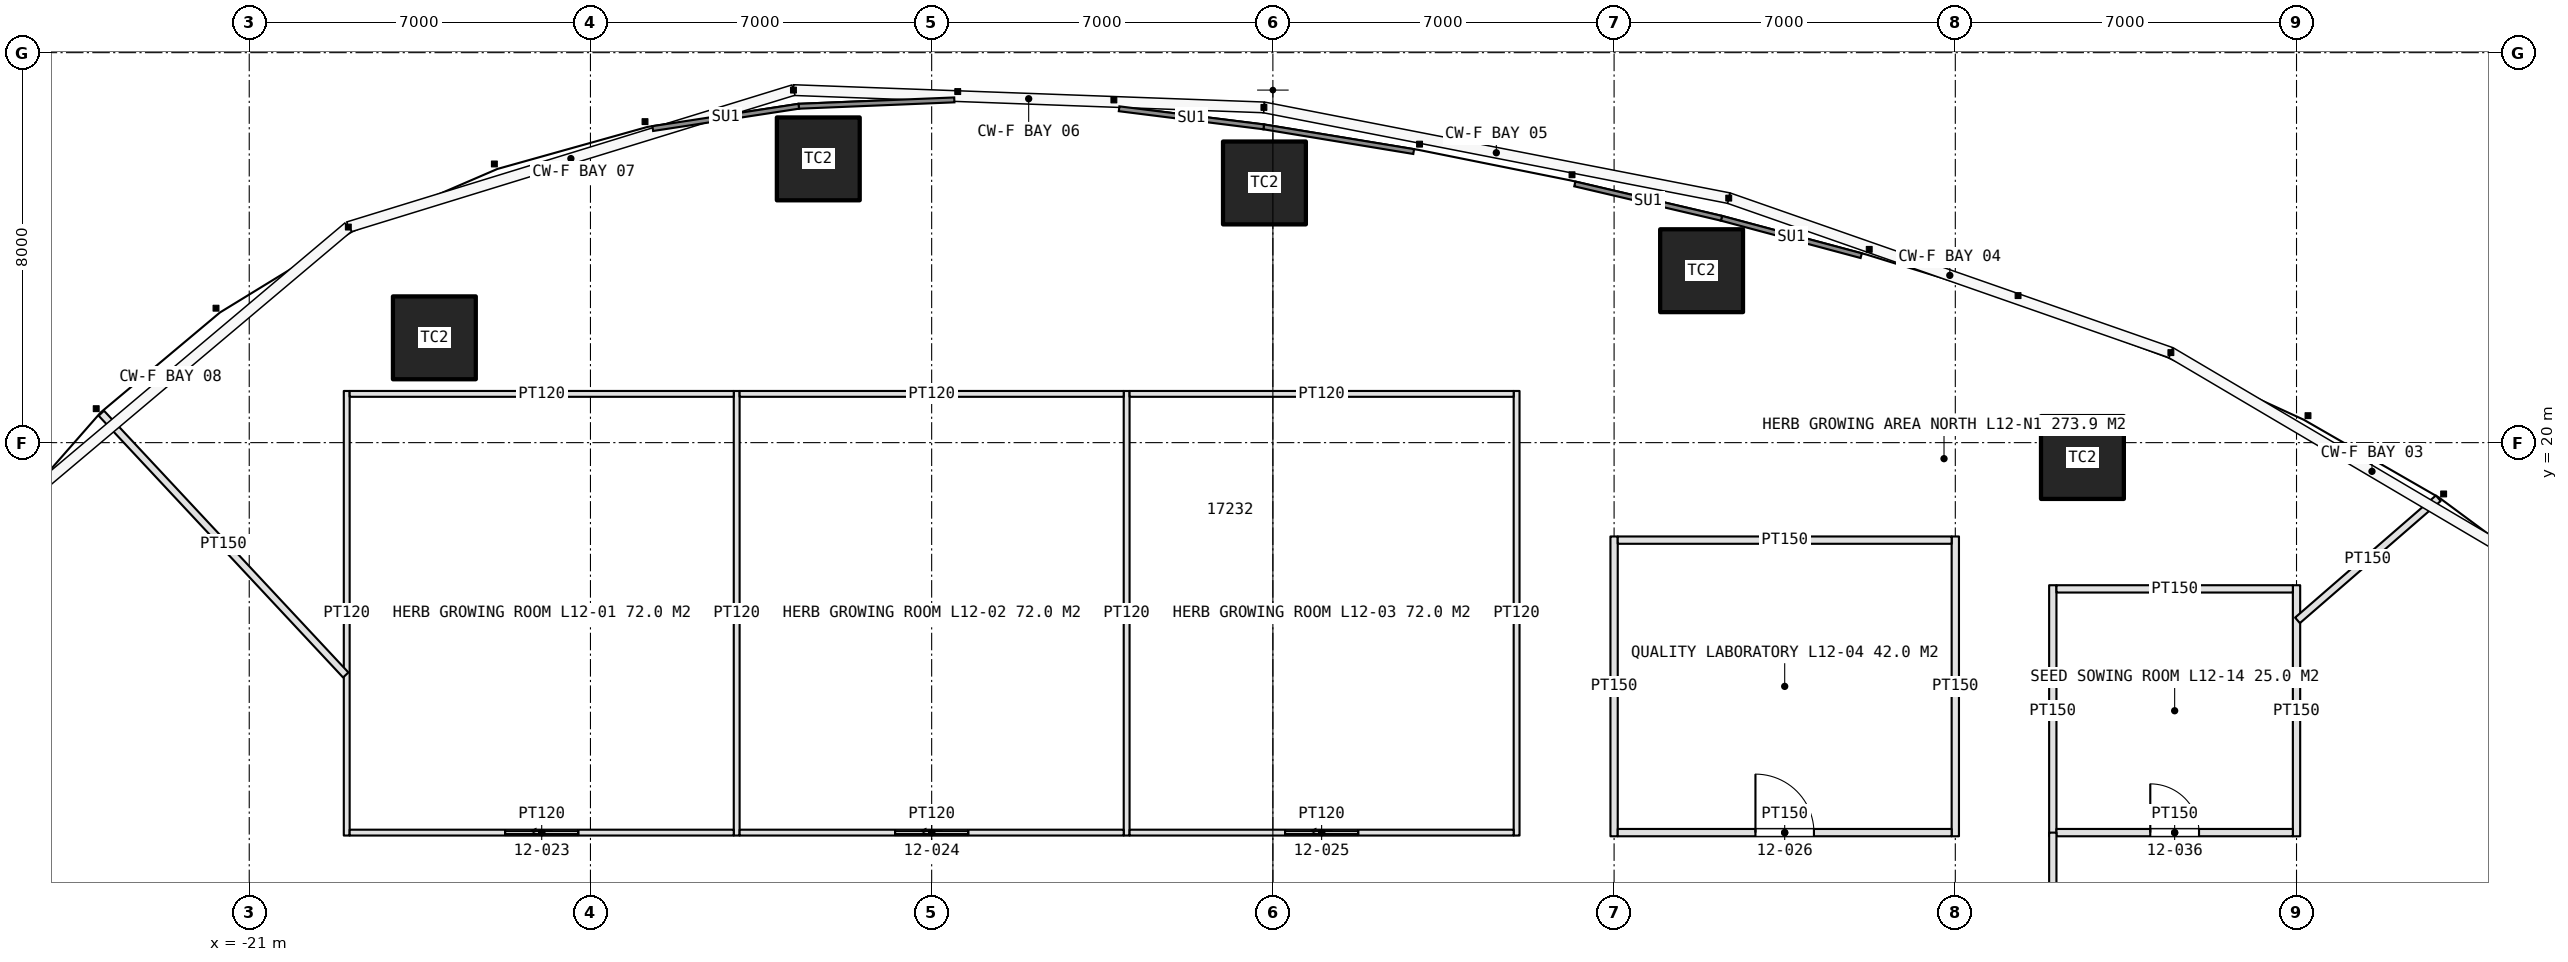
"""IFC4 building model, lengths in metres.
Left out: names, types, materials, properties, quantities, classifications, styles, units other than length and angle.
Written with IfcOpenShell. Run it as: python <this file> out.ifc"""

import sys

from ifc_helpers import new_model, si_unit, direction, frame, frame_2d, origin, origin_2d, place, context, subcontext, project, spatial, rectangle, extrude, element, fill, save


model = new_model("IFC4")
c1 = context("Model", 3, precision=1e-05, world=origin(), true_north=direction((0.0, 1.0)))
c2 = subcontext(c1, "Body", "Model", "MODEL_VIEW")
j1 = project(units=[si_unit("LENGTHUNIT", "METRE"), si_unit("PLANEANGLEUNIT", "RADIAN")], contexts=[c1])
p1 = place(None, origin())
s1 = spatial("IfcSite", under=j1, at=p1, CompositionType="ELEMENT")
p2 = place(p1, origin())
s2 = spatial("IfcBuilding", under=s1, at=p2, CompositionType="ELEMENT")
p3 = place(p2, frame((0.0, 0.0, 60.0)))
s3 = spatial("IfcBuildingStorey", under=s2, at=p3, CompositionType="ELEMENT", Elevation=60.0)
for number, where, z_axis, x_axis in (
    (1, (16.608, 19.695, 0.0), (0.0, 0.0, 1.0), (1.0, 0.0, 0.0)),
    (2, (8.795, 23.527, 0.0), (0.0, 0.0, 1.0), (1.0, 0.0, 0.0)),
    (3, (-0.173, 25.327, 0.0), (0.0, 0.0, 1.0), (1.0, 0.0, 0.0)),
    (4, (-9.326, 25.821, 0.0), (0.0, 0.0, 1.0), (1.0, 0.0, 0.0)),
    (5, (-17.202, 22.15, 0.0), (0.0, 0.0, 1.0), (1.0, 0.0, 0.0)),
):
    element("IfcColumn", number, at=place(p3, frame(where, z_axis=z_axis, x_axis=x_axis)), inside=s3, PredefinedType="COLUMN", context=c2, shape_type="SweptSolid", body=[
        extrude(rectangle(XDim=1.7, YDim=1.7, at=origin_2d()), origin(), (0.0, 0.0, 1.0), 5.0),
    ])
for number, where, z_axis, x_axis in (
    (6, (-19.0, 11.94, 0.0), (0.0, 0.0, 1.0), (0.0, 1.0, 0.0)),
    (7, (-11.0, 11.94, 0.0), (0.0, 0.0, 1.0), (0.0, 1.0, 0.0)),
    (8, (-3.0, 11.94, 0.0), (0.0, 0.0, 1.0), (0.0, 1.0, 0.0)),
    (9, (5.0, 11.94, 0.0), (0.0, 0.0, 1.0), (0.0, 1.0, 0.0)),
):
    element("IfcWall", number, at=place(p3, frame(where, z_axis=z_axis, x_axis=x_axis)), inside=s3, PredefinedType="PARTITIONING", context=c2, shape_type="SweptSolid", body=[
        extrude(rectangle(XDim=9.12, YDim=0.12, at=frame_2d((4.56, 0.0))), origin(), (0.0, 0.0, 1.0), 3.6),
    ])
p4 = place(p3, frame((-18.94, 12.0, 0.0), z_axis=(0.0, 0.0, 1.0), x_axis=(1.0, 0.0, 0.0)))
e10 = element("IfcWall", 10, at=p4, inside=s3, PredefinedType="PARTITIONING", context=c2, shape_type="SweptSolid", body=[
    extrude(rectangle(XDim=7.88, YDim=0.12, at=frame_2d((3.94, 0.0))), origin(), (0.0, 0.0, 1.0), 3.6),
])
p5 = place(p4, frame((3.19, 0.0, 0.0)))
e11 = element("IfcOpeningElement", 11, at=p5, cuts=e10, PredefinedType="OPENING", context=c2, shape_type="SweptSolid", body=[
    extrude(rectangle(XDim=1.5, YDim=2.5, at=frame_2d((0.75, 1.25))), frame((0.0, 0.07, 0.0), z_axis=(0.0, -1.0, 0.0), x_axis=(1.0, 0.0, 0.0)), (0.0, 0.0, 1.0), 0.14),
])
p6 = place(p3, frame((-18.94, 21.0, 0.0), z_axis=(0.0, 0.0, 1.0), x_axis=(1.0, 0.0, 0.0)))
e12 = element("IfcWall", 12, at=p6, inside=s3, PredefinedType="PARTITIONING", context=c2, shape_type="SweptSolid", body=[
    extrude(rectangle(XDim=7.88, YDim=0.12, at=frame_2d((3.94, 0.0))), origin(), (0.0, 0.0, 1.0), 3.6),
])
p7 = place(p3, frame((-10.94, 12.0, 0.0), z_axis=(0.0, 0.0, 1.0), x_axis=(1.0, 0.0, 0.0)))
e13 = element("IfcWall", 13, at=p7, inside=s3, PredefinedType="PARTITIONING", context=c2, shape_type="SweptSolid", body=[
    extrude(rectangle(XDim=7.88, YDim=0.12, at=frame_2d((3.94, 0.0))), origin(), (0.0, 0.0, 1.0), 3.6),
])
p8 = place(p7, frame((3.19, 0.0, 0.0)))
e14 = element("IfcOpeningElement", 14, at=p8, cuts=e13, PredefinedType="OPENING", context=c2, shape_type="SweptSolid", body=[
    extrude(rectangle(XDim=1.5, YDim=2.5, at=frame_2d((0.75, 1.25))), frame((0.0, 0.07, 0.0), z_axis=(0.0, -1.0, 0.0), x_axis=(1.0, 0.0, 0.0)), (0.0, 0.0, 1.0), 0.14),
])
p9 = place(p3, frame((-10.94, 21.0, 0.0), z_axis=(0.0, 0.0, 1.0), x_axis=(1.0, 0.0, 0.0)))
e15 = element("IfcWall", 15, at=p9, inside=s3, PredefinedType="PARTITIONING", context=c2, shape_type="SweptSolid", body=[
    extrude(rectangle(XDim=7.88, YDim=0.12, at=frame_2d((3.94, 0.0))), origin(), (0.0, 0.0, 1.0), 3.6),
])
p10 = place(p3, frame((-2.94, 12.0, 0.0), z_axis=(0.0, 0.0, 1.0), x_axis=(1.0, 0.0, 0.0)))
e16 = element("IfcWall", 16, at=p10, inside=s3, PredefinedType="PARTITIONING", context=c2, shape_type="SweptSolid", body=[
    extrude(rectangle(XDim=7.88, YDim=0.12, at=frame_2d((3.94, 0.0))), origin(), (0.0, 0.0, 1.0), 3.6),
])
p11 = place(p10, frame((3.19, 0.0, 0.0)))
e17 = element("IfcOpeningElement", 17, at=p11, cuts=e16, PredefinedType="OPENING", context=c2, shape_type="SweptSolid", body=[
    extrude(rectangle(XDim=1.5, YDim=2.5, at=frame_2d((0.75, 1.25))), frame((0.0, 0.07, 0.0), z_axis=(0.0, -1.0, 0.0), x_axis=(1.0, 0.0, 0.0)), (0.0, 0.0, 1.0), 0.14),
])
p12 = place(p3, frame((-2.94, 21.0, 0.0), z_axis=(0.0, 0.0, 1.0), x_axis=(1.0, 0.0, 0.0)))
e18 = element("IfcWall", 18, at=p12, inside=s3, PredefinedType="PARTITIONING", context=c2, shape_type="SweptSolid", body=[
    extrude(rectangle(XDim=7.88, YDim=0.12, at=frame_2d((3.94, 0.0))), origin(), (0.0, 0.0, 1.0), 3.6),
])
for number, where, z_axis, x_axis in (
    (19, (7.0, 11.925, 0.0), (0.0, 0.0, 1.0), (0.0, 1.0, 0.0)),
    (20, (14.0, 11.925, 0.0), (0.0, 0.0, 1.0), (0.0, 1.0, 0.0)),
):
    element("IfcWall", number, at=place(p3, frame(where, z_axis=z_axis, x_axis=x_axis)), inside=s3, PredefinedType="PARTITIONING", context=c2, shape_type="SweptSolid", body=[
        extrude(rectangle(XDim=6.15, YDim=0.15, at=frame_2d((3.075, 0.0))), origin(), (0.0, 0.0, 1.0), 3.6),
    ])
p13 = place(p3, frame((7.075, 12.0, 0.0), z_axis=(0.0, 0.0, 1.0), x_axis=(1.0, 0.0, 0.0)))
e21 = element("IfcWall", 21, at=p13, inside=s3, PredefinedType="PARTITIONING", context=c2, shape_type="SweptSolid", body=[
    extrude(rectangle(XDim=6.85, YDim=0.15, at=frame_2d((3.425, 0.0))), origin(), (0.0, 0.0, 1.0), 3.6),
])
p14 = place(p13, frame((2.825, 0.0, 0.0)))
e22 = element("IfcOpeningElement", 22, at=p14, cuts=e21, PredefinedType="OPENING", context=c2, shape_type="SweptSolid", body=[
    extrude(rectangle(XDim=1.2, YDim=2.3, at=frame_2d((0.6, 1.15))), frame((0.0, 0.085, 0.0), z_axis=(0.0, -1.0, 0.0), x_axis=(1.0, 0.0, 0.0)), (0.0, 0.0, 1.0), 0.17),
])
p15 = place(p3, frame((7.075, 18.0, 0.0), z_axis=(0.0, 0.0, 1.0), x_axis=(1.0, 0.0, 0.0)))
e23 = element("IfcWall", 23, at=p15, inside=s3, PredefinedType="PARTITIONING", context=c2, shape_type="SweptSolid", body=[
    extrude(rectangle(XDim=6.85, YDim=0.15, at=frame_2d((3.425, 0.0))), origin(), (0.0, 0.0, 1.0), 3.6),
])
for number, where, z_axis, x_axis in (
    (24, (16.0, 11.925, 0.0), (0.0, 0.0, 1.0), (0.0, 1.0, 0.0)),
    (25, (21.0, 11.925, 0.0), (0.0, 0.0, 1.0), (0.0, 1.0, 0.0)),
):
    element("IfcWall", number, at=place(p3, frame(where, z_axis=z_axis, x_axis=x_axis)), inside=s3, PredefinedType="PARTITIONING", context=c2, shape_type="SweptSolid", body=[
        extrude(rectangle(XDim=5.15, YDim=0.15, at=frame_2d((2.575, 0.0))), origin(), (0.0, 0.0, 1.0), 3.6),
    ])
p16 = place(p3, frame((16.075, 12.0, 0.0), z_axis=(0.0, 0.0, 1.0), x_axis=(1.0, 0.0, 0.0)))
e26 = element("IfcWall", 26, at=p16, inside=s3, PredefinedType="PARTITIONING", context=c2, shape_type="SweptSolid", body=[
    extrude(rectangle(XDim=4.85, YDim=0.15, at=frame_2d((2.425, 0.0))), origin(), (0.0, 0.0, 1.0), 3.6),
])
p17 = place(p16, frame((1.925, 0.0, 0.0)))
e27 = element("IfcOpeningElement", 27, at=p17, cuts=e26, PredefinedType="OPENING", context=c2, shape_type="SweptSolid", body=[
    extrude(rectangle(XDim=1.0, YDim=2.2, at=frame_2d((0.5, 1.1))), frame((0.0, 0.085, 0.0), z_axis=(0.0, -1.0, 0.0), x_axis=(1.0, 0.0, 0.0)), (0.0, 0.0, 1.0), 0.17),
])
p18 = place(p3, frame((16.075, 17.0, 0.0), z_axis=(0.0, 0.0, 1.0), x_axis=(1.0, 0.0, 0.0)))
e28 = element("IfcWall", 28, at=p18, inside=s3, PredefinedType="PARTITIONING", context=c2, shape_type="SweptSolid", body=[
    extrude(rectangle(XDim=4.85, YDim=0.15, at=frame_2d((2.425, 0.0))), origin(), (0.0, 0.0, 1.0), 3.6),
])
p19 = place(p3, frame((-19.02, 15.234, 0.0), z_axis=(0.0, 0.0, 1.0), x_axis=(-0.682519491562, 0.730867391281, 0.0)))
e29 = element("IfcWall", 29, at=p19, inside=s3, PredefinedType="PARTITIONING", context=c2, shape_type="SweptSolid", body=[
    extrude(rectangle(XDim=7.347, YDim=0.15, at=frame_2d((3.674, 0.0))), origin(), (0.0, 0.0, 1.0), 3.6),
])
p20 = place(p3, frame((21.02, 16.354, 0.0), z_axis=(0.0, 0.0, 1.0), x_axis=(0.755425653008, 0.655234372402, 0.0)))
e30 = element("IfcWall", 30, at=p20, inside=s3, PredefinedType="PARTITIONING", context=c2, shape_type="SweptSolid", body=[
    extrude(rectangle(XDim=3.823, YDim=0.15, at=frame_2d((1.912, 0.0))), origin(), (0.0, 0.0, 1.0), 3.6),
])
p21 = place(p3, frame((16.0, 5.5, 0.0), z_axis=(0.0, 0.0, 1.0), x_axis=(0.0, 1.0, 0.0)))
e31 = element("IfcWall", 31, at=p21, inside=s3, PredefinedType="PARTITIONING", context=c2, shape_type="SweptSolid", body=[
    extrude(rectangle(XDim=6.5, YDim=0.15, at=frame_2d((3.25, 0.0))), origin(), (0.0, 0.0, 1.0), 3.6),
])
p22 = place(p21, frame((0.4, 0.0, 0.0)))
e32 = element("IfcOpeningElement", 32, at=p22, cuts=e31, PredefinedType="OPENING", context=c2, shape_type="SweptSolid", body=[
    extrude(rectangle(XDim=1.6, YDim=2.4, at=frame_2d((0.8, 1.2))), frame((0.0, 0.085, 0.0), z_axis=(0.0, -1.0, 0.0), x_axis=(1.0, 0.0, 0.0)), (0.0, 0.0, 1.0), 0.17),
])
p23 = place(p5, origin())
e33 = element("IfcDoor", 33, at=p23, inside=s3, OperationType="SLIDING_TO_LEFT", PredefinedType="DOOR", context=c2, shape_type="SweptSolid", body=[
    extrude(rectangle(XDim=1.5, YDim=2.5, at=frame_2d((0.75, 1.25))), frame((0.0, 0.025, 0.0), z_axis=(0.0, -1.0, 0.0), x_axis=(1.0, 0.0, 0.0)), (0.0, 0.0, 1.0), 0.05),
])
fill(e11, e33)
p24 = place(p8, origin())
e34 = element("IfcDoor", 34, at=p24, inside=s3, OperationType="SLIDING_TO_LEFT", PredefinedType="DOOR", context=c2, shape_type="SweptSolid", body=[
    extrude(rectangle(XDim=1.5, YDim=2.5, at=frame_2d((0.75, 1.25))), frame((0.0, 0.025, 0.0), z_axis=(0.0, -1.0, 0.0), x_axis=(1.0, 0.0, 0.0)), (0.0, 0.0, 1.0), 0.05),
])
fill(e14, e34)
p25 = place(p11, origin())
e35 = element("IfcDoor", 35, at=p25, inside=s3, OperationType="SLIDING_TO_LEFT", PredefinedType="DOOR", context=c2, shape_type="SweptSolid", body=[
    extrude(rectangle(XDim=1.5, YDim=2.5, at=frame_2d((0.75, 1.25))), frame((0.0, 0.025, 0.0), z_axis=(0.0, -1.0, 0.0), x_axis=(1.0, 0.0, 0.0)), (0.0, 0.0, 1.0), 0.05),
])
fill(e17, e35)
p26 = place(p14, origin())
e36 = element("IfcDoor", 36, at=p26, inside=s3, OperationType="SINGLE_SWING_LEFT", PredefinedType="DOOR", context=c2, shape_type="SweptSolid", body=[
    extrude(rectangle(XDim=1.2, YDim=2.3, at=frame_2d((0.6, 1.15))), frame((0.0, 0.025, 0.0), z_axis=(0.0, -1.0, 0.0), x_axis=(1.0, 0.0, 0.0)), (0.0, 0.0, 1.0), 0.05),
])
fill(e22, e36)
p27 = place(p17, origin())
e37 = element("IfcDoor", 37, at=p27, inside=s3, OperationType="SINGLE_SWING_LEFT", PredefinedType="DOOR", context=c2, shape_type="SweptSolid", body=[
    extrude(rectangle(XDim=1.0, YDim=2.2, at=frame_2d((0.5, 1.1))), frame((0.0, 0.025, 0.0), z_axis=(0.0, -1.0, 0.0), x_axis=(1.0, 0.0, 0.0)), (0.0, 0.0, 1.0), 0.05),
])
fill(e27, e37)
save(model, sys.argv[1])
